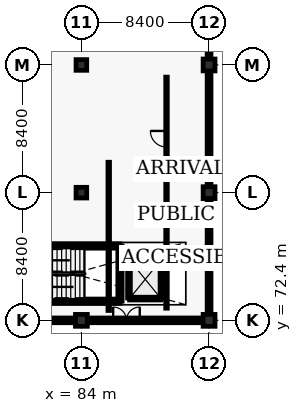
"""IFC4 building model, lengths in metres.
Left out: names, types, materials, properties, quantities, classifications, styles, units other than length and angle.
Written with IfcOpenShell. Run it as: python <this file> out.ifc"""

import sys

from ifc_helpers import new_model, si_unit, direction, frame, frame_2d, origin, origin_2d, place, context, subcontext, project, spatial, rectangle, circle, extrude, element, fill, save


model = new_model("IFC4")
c1 = context("Model", 3, precision=1e-05, world=origin(), true_north=direction((0.0, 1.0)))
c2 = subcontext(c1, "Body", "Model", "MODEL_VIEW")
j1 = project(units=[si_unit("LENGTHUNIT", "METRE"), si_unit("PLANEANGLEUNIT", "RADIAN")], contexts=[c1])
p1 = place(None, origin())
s1 = spatial("IfcSite", under=j1, at=p1, CompositionType="ELEMENT")
p2 = place(p1, origin())
s2 = spatial("IfcBuilding", under=s1, at=p2, CompositionType="ELEMENT")
p3 = place(p2, origin())
s3 = spatial("IfcBuildingStorey", under=s2, at=p3, CompositionType="ELEMENT", Elevation=0.0)
p4 = place(p3, frame((84.0, 72.4, -0.46), z_axis=(0.0, 0.0, 1.0), x_axis=(1.0, 0.0, 0.0)))
e1 = element("IfcColumn", 1, at=p4, inside=s3, PredefinedType="COLUMN", context=c2, shape_type="SweptSolid", body=[
    extrude(circle(Radius=0.39, at=origin_2d()), origin(), (0.0, 0.0, 1.0), 5.9),
])
for number, where, z_axis, x_axis in (
    (2, (84.0, 80.8, -0.46), (0.0, 0.0, 1.0), (1.0, 0.0, 0.0)),
    (3, (84.0, 89.2, -0.46), (0.0, 0.0, 1.0), (1.0, 0.0, 0.0)),
):
    element("IfcColumn", number, at=place(p3, frame(where, z_axis=z_axis, x_axis=x_axis)), inside=s3, PredefinedType="COLUMN", context=c2, shape_type="SweptSolid", body=[
        extrude(rectangle(XDim=0.7, YDim=0.7, at=origin_2d()), origin(), (0.0, 0.0, 1.0), 5.9),
    ])
for number, where, z_axis, x_axis in (
    (4, (92.4, 72.4, -0.46), (0.0, 0.0, 1.0), (1.0, 0.0, 0.0)),
    (5, (92.4, 80.8, -0.46), (0.0, 0.0, 1.0), (1.0, 0.0, 0.0)),
    (6, (92.4, 89.2, -0.46), (0.0, 0.0, 1.0), (1.0, 0.0, 0.0)),
):
    element("IfcColumn", number, at=place(p3, frame(where, z_axis=z_axis, x_axis=x_axis)), inside=s3, PredefinedType="COLUMN", context=c2, shape_type="SweptSolid", body=[
        extrude(circle(Radius=0.39, at=origin_2d()), origin(), (0.0, 0.0, 1.0), 5.9),
    ])
p5 = place(p3, frame((75.99, 72.4, 0.0), z_axis=(0.0, 0.0, 1.0), x_axis=(1.0, 0.0, 0.0)))
e7 = element("IfcWall", 7, at=p5, inside=s3, PredefinedType="SOLIDWALL", context=c2, shape_type="SweptSolid", body=[
    extrude(rectangle(XDim=7.62, YDim=0.31, at=frame_2d((3.81, 0.0))), origin(), (0.0, 0.0, 1.0), 4.605),
])
p6 = place(p5, frame((2.8, 0.0, 1.0)))
e8 = element("IfcOpeningElement", 8, at=p6, cuts=e7, PredefinedType="OPENING", context=c2, shape_type="SweptSolid", body=[
    extrude(rectangle(XDim=1.9, YDim=1.55, at=frame_2d((0.95, 0.775))), frame((0.0, 0.165, 0.0), z_axis=(0.0, -1.0, 0.0), x_axis=(1.0, 0.0, 0.0)), (0.0, 0.0, 1.0), 0.33),
])
p7 = place(p3, frame((84.39, 72.4, 0.0), z_axis=(0.0, 0.0, 1.0), x_axis=(1.0, 0.0, 0.0)))
e9 = element("IfcWall", 9, at=p7, inside=s3, PredefinedType="SOLIDWALL", context=c2, shape_type="SweptSolid", body=[
    extrude(rectangle(XDim=7.62, YDim=0.31, at=frame_2d((3.81, 0.0))), origin(), (0.0, 0.0, 1.0), 4.605),
])
p8 = place(p7, frame((1.7, 0.0, 0.0)))
e10 = element("IfcOpeningElement", 10, at=p8, cuts=e9, PredefinedType="OPENING", context=c2, shape_type="SweptSolid", body=[
    extrude(rectangle(XDim=1.75, YDim=2.15, at=frame_2d((0.875, 1.075))), frame((0.0, 0.165, 0.0), z_axis=(0.0, -1.0, 0.0), x_axis=(1.0, 0.0, 0.0)), (0.0, 0.0, 1.0), 0.33),
])
p9 = place(p7, frame((4.35, 0.0, 1.0)))
e11 = element("IfcOpeningElement", 11, at=p9, cuts=e9, PredefinedType="OPENING", context=c2, shape_type="SweptSolid", body=[
    extrude(rectangle(XDim=2.2, YDim=1.55, at=frame_2d((1.1, 0.775))), frame((0.0, 0.165, 0.0), z_axis=(0.0, -1.0, 0.0), x_axis=(1.0, 0.0, 0.0)), (0.0, 0.0, 1.0), 0.33),
])
p10 = place(p3, frame((92.4, 72.79, 0.0), z_axis=(0.0, 0.0, 1.0), x_axis=(0.0, 1.0, 0.0)))
e12 = element("IfcWall", 12, at=p10, inside=s3, PredefinedType="SOLIDWALL", context=c2, shape_type="SweptSolid", body=[
    extrude(rectangle(XDim=7.62, YDim=0.25, at=frame_2d((3.81, 0.0))), origin(), (0.0, 0.0, 1.0), 4.605),
])
p11 = place(p10, frame((2.65, 0.0, 1.0)))
e13 = element("IfcOpeningElement", 13, at=p11, cuts=e12, PredefinedType="OPENING", context=c2, shape_type="SweptSolid", body=[
    extrude(rectangle(XDim=2.2, YDim=1.55, at=frame_2d((1.1, 0.775))), frame((0.0, 0.135, 0.0), z_axis=(0.0, -1.0, 0.0), x_axis=(1.0, 0.0, 0.0)), (0.0, 0.0, 1.0), 0.27),
])
p12 = place(p3, frame((92.4, 81.19, 0.0), z_axis=(0.0, 0.0, 1.0), x_axis=(0.0, 1.0, 0.0)))
e14 = element("IfcWall", 14, at=p12, inside=s3, PredefinedType="SOLIDWALL", context=c2, shape_type="SweptSolid", body=[
    extrude(rectangle(XDim=7.62, YDim=0.25, at=frame_2d((3.81, 0.0))), origin(), (0.0, 0.0, 1.0), 4.605),
])
p13 = place(p12, frame((2.65, 0.0, 1.0)))
e15 = element("IfcOpeningElement", 15, at=p13, cuts=e14, PredefinedType="OPENING", context=c2, shape_type="SweptSolid", body=[
    extrude(rectangle(XDim=1.9, YDim=1.55, at=frame_2d((0.95, 0.775))), frame((0.0, 0.135, 0.0), z_axis=(0.0, -1.0, 0.0), x_axis=(1.0, 0.0, 0.0)), (0.0, 0.0, 1.0), 0.27),
])
p14 = place(p3, frame((92.4, 89.59, 0.0), z_axis=(0.0, 0.0, 1.0), x_axis=(0.0, 1.0, 0.0)))
e16 = element("IfcWall", 16, at=p14, inside=s3, PredefinedType="SOLIDWALL", context=c2, shape_type="SweptSolid", body=[
    extrude(rectangle(XDim=7.62, YDim=0.25, at=frame_2d((3.81, 0.0))), origin(), (0.0, 0.0, 1.0), 4.605),
])
p15 = place(p14, frame((2.65, 0.0, 1.0)))
e17 = element("IfcOpeningElement", 17, at=p15, cuts=e16, PredefinedType="OPENING", context=c2, shape_type="SweptSolid", body=[
    extrude(rectangle(XDim=2.5, YDim=1.05, at=frame_2d((1.25, 0.525))), frame((0.0, 0.135, 0.0), z_axis=(0.0, -1.0, 0.0), x_axis=(1.0, 0.0, 0.0)), (0.0, 0.0, 1.0), 0.27),
])
for number, where, z_axis, x_axis in (
    (18, (77.66, 73.66, 0.0), (0.0, 0.0, 1.0), (1.0, 0.0, 0.0)),
    (19, (77.66, 77.29, 0.0), (0.0, 0.0, 1.0), (1.0, 0.0, 0.0)),
):
    element("IfcWall", number, at=place(p3, frame(where, z_axis=z_axis, x_axis=x_axis)), inside=s3, PredefinedType="SHEAR", context=c2, shape_type="SweptSolid", body=[
        extrude(rectangle(XDim=8.88, YDim=0.28, at=frame_2d((4.44, 0.0))), origin(), (0.0, 0.0, 1.0), 5.44),
    ])
p16 = place(p3, frame((86.54, 73.66, 0.0), z_axis=(0.0, 0.0, 1.0), x_axis=(0.0, 1.0, 0.0)))
e20 = element("IfcWall", 20, at=p16, inside=s3, PredefinedType="SHEAR", context=c2, shape_type="SweptSolid", body=[
    extrude(rectangle(XDim=3.63, YDim=0.28, at=frame_2d((1.815, 0.0))), origin(), (0.0, 0.0, 1.0), 5.44),
])
p17 = place(p3, frame((87.17, 73.87, 0.0), z_axis=(0.0, 0.0, 1.0), x_axis=(1.0, 0.0, 0.0)))
e21 = element("IfcWall", 21, at=p17, inside=s3, PredefinedType="SHEAR", context=c2, shape_type="SweptSolid", body=[
    extrude(rectangle(XDim=2.06, YDim=0.26, at=frame_2d((1.03, 0.0))), origin(), (0.0, 0.0, 1.0), 5.44),
])
for number, where, z_axis, x_axis in (
    (22, (89.23, 73.87, 0.0), (0.0, 0.0, 1.0), (0.0, 1.0, 0.0)),
    (23, (87.17, 76.33, 0.0), (0.0, 0.0, 1.0), (0.0, -1.0, 0.0)),
):
    element("IfcWall", number, at=place(p3, frame(where, z_axis=z_axis, x_axis=x_axis)), inside=s3, PredefinedType="SHEAR", context=c2, shape_type="SweptSolid", body=[
        extrude(rectangle(XDim=2.46, YDim=0.26, at=frame_2d((1.23, 0.0))), origin(), (0.0, 0.0, 1.0), 5.44),
    ])
p18 = place(p3, frame((87.17, 76.33, 0.0), z_axis=(0.0, 0.0, 1.0), x_axis=(1.0, 0.0, 0.0)))
e24 = element("IfcWall", 24, at=p18, inside=s3, PredefinedType="SHEAR", context=c2, shape_type="SweptSolid", body=[
    extrude(rectangle(XDim=2.06, YDim=0.26, at=frame_2d((1.03, 0.0))), origin(), (0.0, 0.0, 1.0), 5.44),
])
p19 = place(p18, frame((0.46, 0.0, 0.0)))
e25 = element("IfcOpeningElement", 25, at=p19, cuts=e24, PredefinedType="OPENING", context=c2, shape_type="SweptSolid", body=[
    extrude(rectangle(XDim=1.14, YDim=2.14, at=frame_2d((0.57, 1.07))), frame((0.0, 0.14, 0.0), z_axis=(0.0, -1.0, 0.0), x_axis=(1.0, 0.0, 0.0)), (0.0, 0.0, 1.0), 0.28),
])
p20 = place(p3, frame((89.6, 73.2, 0.0), z_axis=(0.0, 0.0, 1.0), x_axis=(0.0, 1.0, 0.0)))
e26 = element("IfcWall", 26, at=p20, inside=s3, PredefinedType="PARTITIONING", context=c2, shape_type="SweptSolid", body=[
    extrude(rectangle(XDim=15.2, YDim=0.1, at=frame_2d((7.6, 0.0))), origin(), (0.0, 0.0, 1.0), 3.0),
])
p21 = place(p20, frame((10.6, 0.0, 0.0)))
e27 = element("IfcOpeningElement", 27, at=p21, cuts=e26, PredefinedType="OPENING", context=c2, shape_type="SweptSolid", body=[
    extrude(rectangle(XDim=1.06, YDim=2.1, at=frame_2d((0.53, 1.05))), frame((0.0, 0.06, 0.0), z_axis=(0.0, -1.0, 0.0), x_axis=(1.0, 0.0, 0.0)), (0.0, 0.0, 1.0), 0.12),
])
p22 = place(p3, frame((85.8, 73.05, 0.0), z_axis=(0.0, 0.0, 1.0), x_axis=(0.0, 1.0, 0.0)))
e28 = element("IfcWall", 28, at=p22, inside=s3, PredefinedType="PARTITIONING", context=c2, shape_type="SweptSolid", body=[
    extrude(rectangle(XDim=9.75, YDim=0.1, at=frame_2d((4.875, 0.0))), origin(), (0.0, 0.0, 1.0), 2.65),
])
p23 = place(p8, origin())
e29 = element("IfcDoor", 29, at=p23, inside=s3, OperationType="DOUBLE_DOOR_SINGLE_SWING", PredefinedType="DOOR", context=c2, shape_type="SweptSolid", body=[
    extrude(rectangle(XDim=1.75, YDim=2.15, at=frame_2d((0.875, 1.075))), frame((0.0, 0.025, 0.0), z_axis=(0.0, -1.0, 0.0), x_axis=(1.0, 0.0, 0.0)), (0.0, 0.0, 1.0), 0.05),
])
fill(e10, e29)
p24 = place(p9, origin())
e30 = element("IfcWindow", 30, at=p24, inside=s3, PartitioningType="DOUBLE_PANEL_VERTICAL", PredefinedType="WINDOW", context=c2, shape_type="SweptSolid", body=[
    extrude(rectangle(XDim=2.2, YDim=1.55, at=frame_2d((1.1, 0.775))), frame((0.0, 0.03, 0.0), z_axis=(0.0, -1.0, 0.0), x_axis=(1.0, 0.0, 0.0)), (0.0, 0.0, 1.0), 0.06),
])
fill(e11, e30)
p25 = place(p11, origin())
e31 = element("IfcWindow", 31, at=p25, inside=s3, PartitioningType="DOUBLE_PANEL_VERTICAL", PredefinedType="WINDOW", context=c2, shape_type="SweptSolid", body=[
    extrude(rectangle(XDim=2.2, YDim=1.55, at=frame_2d((1.1, 0.775))), frame((0.0, 0.03, 0.0), z_axis=(0.0, -1.0, 0.0), x_axis=(1.0, 0.0, 0.0)), (0.0, 0.0, 1.0), 0.06),
])
fill(e13, e31)
p26 = place(p13, origin())
e32 = element("IfcWindow", 32, at=p26, inside=s3, PartitioningType="DOUBLE_PANEL_VERTICAL", PredefinedType="WINDOW", context=c2, shape_type="SweptSolid", body=[
    extrude(rectangle(XDim=1.9, YDim=1.55, at=frame_2d((0.95, 0.775))), frame((0.0, 0.03, 0.0), z_axis=(0.0, -1.0, 0.0), x_axis=(1.0, 0.0, 0.0)), (0.0, 0.0, 1.0), 0.06),
])
fill(e15, e32)
p27 = place(p19, origin())
e33 = element("IfcDoor", 33, at=p27, inside=s3, OperationType="DOUBLE_DOOR_SLIDING", PredefinedType="DOOR", context=c2, shape_type="SweptSolid", body=[
    extrude(rectangle(XDim=1.14, YDim=2.14, at=frame_2d((0.57, 1.07))), frame((0.0, 0.025, 0.0), z_axis=(0.0, -1.0, 0.0), x_axis=(1.0, 0.0, 0.0)), (0.0, 0.0, 1.0), 0.05),
])
fill(e25, e33)
p28 = place(p21, origin())
e34 = element("IfcDoor", 34, at=p28, inside=s3, OperationType="SINGLE_SWING_RIGHT", PredefinedType="DOOR", context=c2, shape_type="SweptSolid", body=[
    extrude(rectangle(XDim=1.06, YDim=2.1, at=frame_2d((0.53, 1.05))), frame((0.0, 0.025, 0.0), z_axis=(0.0, -1.0, 0.0), x_axis=(1.0, 0.0, 0.0)), (0.0, 0.0, 1.0), 0.05),
])
fill(e27, e34)
save(model, sys.argv[1])
